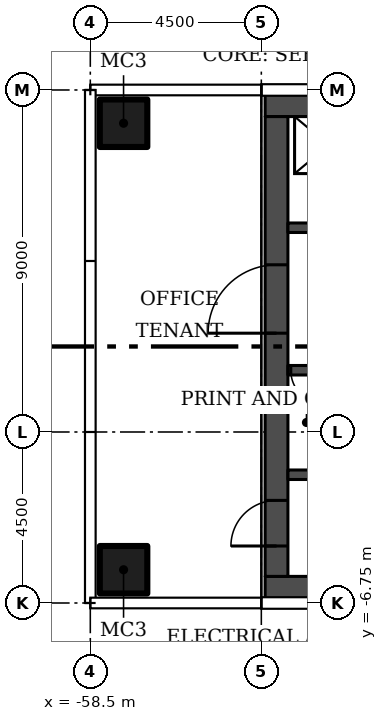
"""IFC4 building model, lengths in metres.
Left out: names, types, materials, properties, quantities, classifications, styles, units other than length and angle.
Written with IfcOpenShell. Run it as: python <this file> out.ifc"""

import sys

from ifc_helpers import new_model, si_unit, direction, frame, frame_2d, origin, origin_2d, place, context, subcontext, project, spatial, rectangle, hollow_rectangle, extrude, element, fill, save


model = new_model("IFC4")
c1 = context("Model", 3, precision=1e-05, world=origin(), true_north=direction((0.0, 1.0)))
c2 = subcontext(c1, "Body", "Model", "MODEL_VIEW")
j1 = project(units=[si_unit("LENGTHUNIT", "METRE"), si_unit("PLANEANGLEUNIT", "RADIAN")], contexts=[c1])
p1 = place(None, origin())
s1 = spatial("IfcSite", under=j1, at=p1, CompositionType="ELEMENT")
p2 = place(p1, origin())
s2 = spatial("IfcBuilding", under=s1, at=p2, CompositionType="ELEMENT")
p3 = place(p2, frame((0.0, 0.0, 124.8)))
s3 = spatial("IfcBuildingStorey", under=s2, at=p3, CompositionType="ELEMENT", Elevation=124.8)
for number, where in (
    (1, (-57.625, -5.875, 0.0)),
    (2, (-57.625, 5.875, 0.0)),
):
    element("IfcColumn", number, at=place(p3, frame(where)), inside=s3, PredefinedType="COLUMN", context=c2, shape_type="SweptSolid", body=[
        extrude(hollow_rectangle(XDim=1.25, YDim=1.25, WallThickness=0.05, at=origin_2d()), origin(), (0.0, 0.0, 1.0), 3.45),
    ])
for number, where, z_axis, x_axis in (
    (3, (-40.6, -6.35, 0.0), (0.0, 0.0, 1.0), (-1.0, 0.0, 0.0)),
    (4, (-40.6, 6.35, 0.0), (0.0, 0.0, 1.0), (-1.0, 0.0, 0.0)),
):
    element("IfcWall", number, at=place(p3, frame(where, z_axis=z_axis, x_axis=x_axis)), inside=s3, PredefinedType="SHEAR", context=c2, shape_type="SweptSolid", body=[
        extrude(rectangle(XDim=13.3, YDim=0.6, at=frame_2d((6.65, 0.0))), origin(), (0.0, 0.0, 1.0), 3.45),
    ])
p4 = place(p3, frame((-53.6, -6.05, 0.0), z_axis=(0.0, 0.0, 1.0), x_axis=(0.0, 1.0, 0.0)))
e5 = element("IfcWall", 5, at=p4, inside=s3, PredefinedType="SHEAR", context=c2, shape_type="SweptSolid", body=[
    extrude(rectangle(XDim=12.1, YDim=0.6, at=frame_2d((6.05, 0.0))), origin(), (0.0, 0.0, 1.0), 3.45),
])
p5 = place(p4, frame((0.8, 0.0, 0.0)))
e6 = element("IfcOpeningElement", 6, at=p5, cuts=e5, PredefinedType="OPENING", context=c2, shape_type="SweptSolid", body=[
    extrude(rectangle(XDim=1.2, YDim=2.1, at=frame_2d((0.6, 1.05))), frame((0.0, 0.31, 0.0), z_axis=(0.0, -1.0, 0.0), x_axis=(1.0, 0.0, 0.0)), (0.0, 0.0, 1.0), 0.62),
])
p6 = place(p4, frame((6.4, 0.0, 0.0)))
e7 = element("IfcOpeningElement", 7, at=p6, cuts=e5, PredefinedType="OPENING", context=c2, shape_type="SweptSolid", body=[
    extrude(rectangle(XDim=1.8, YDim=2.4, at=frame_2d((0.9, 1.2))), frame((0.0, 0.31, 0.0), z_axis=(0.0, -1.0, 0.0), x_axis=(1.0, 0.0, 0.0)), (0.0, 0.0, 1.0), 0.62),
])
p7 = place(p3, frame((-41.2, -3.375, 0.0), z_axis=(0.0, 0.0, 1.0), x_axis=(-1.0, 0.0, 0.0)))
e8 = element("IfcWall", 8, at=p7, inside=s3, PredefinedType="SHEAR", context=c2, shape_type="SweptSolid", body=[
    extrude(rectangle(XDim=12.1, YDim=0.25, at=frame_2d((6.05, 0.0))), origin(), (0.0, 0.0, 1.0), 3.45),
])
p8 = place(p7, frame((0.05, 0.0, 0.0)))
e9 = element("IfcOpeningElement", 9, at=p8, cuts=e8, PredefinedType="OPENING", context=c2, shape_type="SweptSolid", body=[
    extrude(rectangle(XDim=1.1, YDim=2.1, at=frame_2d((0.55, 1.05))), frame((0.0, 0.135, 0.0), z_axis=(0.0, -1.0, 0.0), x_axis=(1.0, 0.0, 0.0)), (0.0, 0.0, 1.0), 0.27),
])
p9 = place(p3, frame((-41.2, -0.625, 0.0), z_axis=(0.0, 0.0, 1.0), x_axis=(-1.0, 0.0, 0.0)))
e10 = element("IfcWall", 10, at=p9, inside=s3, PredefinedType="SHEAR", context=c2, shape_type="SweptSolid", body=[
    extrude(rectangle(XDim=12.1, YDim=0.25, at=frame_2d((6.05, 0.0))), origin(), (0.0, 0.0, 1.0), 3.45),
])
p10 = place(p9, frame((2.25, 0.0, 0.0)))
e11 = element("IfcOpeningElement", 11, at=p10, cuts=e10, PredefinedType="OPENING", context=c2, shape_type="SweptSolid", body=[
    extrude(rectangle(XDim=1.2, YDim=2.1, at=frame_2d((0.6, 1.05))), frame((0.0, 0.135, 0.0), z_axis=(0.0, -1.0, 0.0), x_axis=(1.0, 0.0, 0.0)), (0.0, 0.0, 1.0), 0.27),
])
p11 = place(p9, frame((9.5, 0.0, 0.0)))
e12 = element("IfcOpeningElement", 12, at=p11, cuts=e10, PredefinedType="OPENING", context=c2, shape_type="SweptSolid", body=[
    extrude(rectangle(XDim=0.9, YDim=2.1, at=frame_2d((0.45, 1.05))), frame((0.0, 0.135, 0.0), z_axis=(0.0, -1.0, 0.0), x_axis=(1.0, 0.0, 0.0)), (0.0, 0.0, 1.0), 0.27),
])
p12 = place(p9, frame((11.125, 0.0, 0.0)))
e13 = element("IfcOpeningElement", 13, at=p12, cuts=e10, PredefinedType="OPENING", context=c2, shape_type="SweptSolid", body=[
    extrude(rectangle(XDim=0.9, YDim=2.1, at=frame_2d((0.45, 1.05))), frame((0.0, 0.135, 0.0), z_axis=(0.0, -1.0, 0.0), x_axis=(1.0, 0.0, 0.0)), (0.0, 0.0, 1.0), 0.27),
])
p13 = place(p3, frame((-48.5, 3.125, 0.0), z_axis=(0.0, 0.0, 1.0), x_axis=(-1.0, 0.0, 0.0)))
e14 = element("IfcWall", 14, at=p13, inside=s3, PredefinedType="SHEAR", context=c2, shape_type="SweptSolid", body=[
    extrude(rectangle(XDim=4.8, YDim=0.25, at=frame_2d((2.4, 0.0))), origin(), (0.0, 0.0, 1.0), 3.45),
])
p14 = place(p13, frame((0.775, 0.0, 0.0)))
e15 = element("IfcOpeningElement", 15, at=p14, cuts=e14, PredefinedType="OPENING", context=c2, shape_type="SweptSolid", body=[
    extrude(rectangle(XDim=1.1, YDim=2.1, at=frame_2d((0.55, 1.05))), frame((0.0, 0.135, 0.0), z_axis=(0.0, -1.0, 0.0), x_axis=(1.0, 0.0, 0.0)), (0.0, 0.0, 1.0), 0.27),
])
p15 = place(p5, origin())
e16 = element("IfcDoor", 16, at=p15, inside=s3, OperationType="SINGLE_SWING_LEFT", PredefinedType="DOOR", context=c2, shape_type="SweptSolid", body=[
    extrude(rectangle(XDim=1.2, YDim=2.1, at=frame_2d((0.6, 1.05))), frame((0.0, 0.025, 0.0), z_axis=(0.0, -1.0, 0.0), x_axis=(1.0, 0.0, 0.0)), (0.0, 0.0, 1.0), 0.05),
])
fill(e6, e16)
p16 = place(p6, origin())
e17 = element("IfcDoor", 17, at=p16, inside=s3, OperationType="DOUBLE_DOOR_SINGLE_SWING", PredefinedType="DOOR", context=c2, shape_type="SweptSolid", body=[
    extrude(rectangle(XDim=1.8, YDim=2.4, at=frame_2d((0.9, 1.2))), frame((0.0, 0.025, 0.0), z_axis=(0.0, -1.0, 0.0), x_axis=(1.0, 0.0, 0.0)), (0.0, 0.0, 1.0), 0.05),
])
fill(e7, e17)
p17 = place(p12, origin())
e18 = element("IfcDoor", 18, at=p17, inside=s3, OperationType="SINGLE_SWING_RIGHT", PredefinedType="DOOR", context=c2, shape_type="SweptSolid", body=[
    extrude(rectangle(XDim=0.9, YDim=2.1, at=frame_2d((0.45, 1.05))), frame((0.0, 0.025, 0.0), z_axis=(0.0, -1.0, 0.0), x_axis=(1.0, 0.0, 0.0)), (0.0, 0.0, 1.0), 0.05),
])
fill(e13, e18)
save(model, sys.argv[1])
